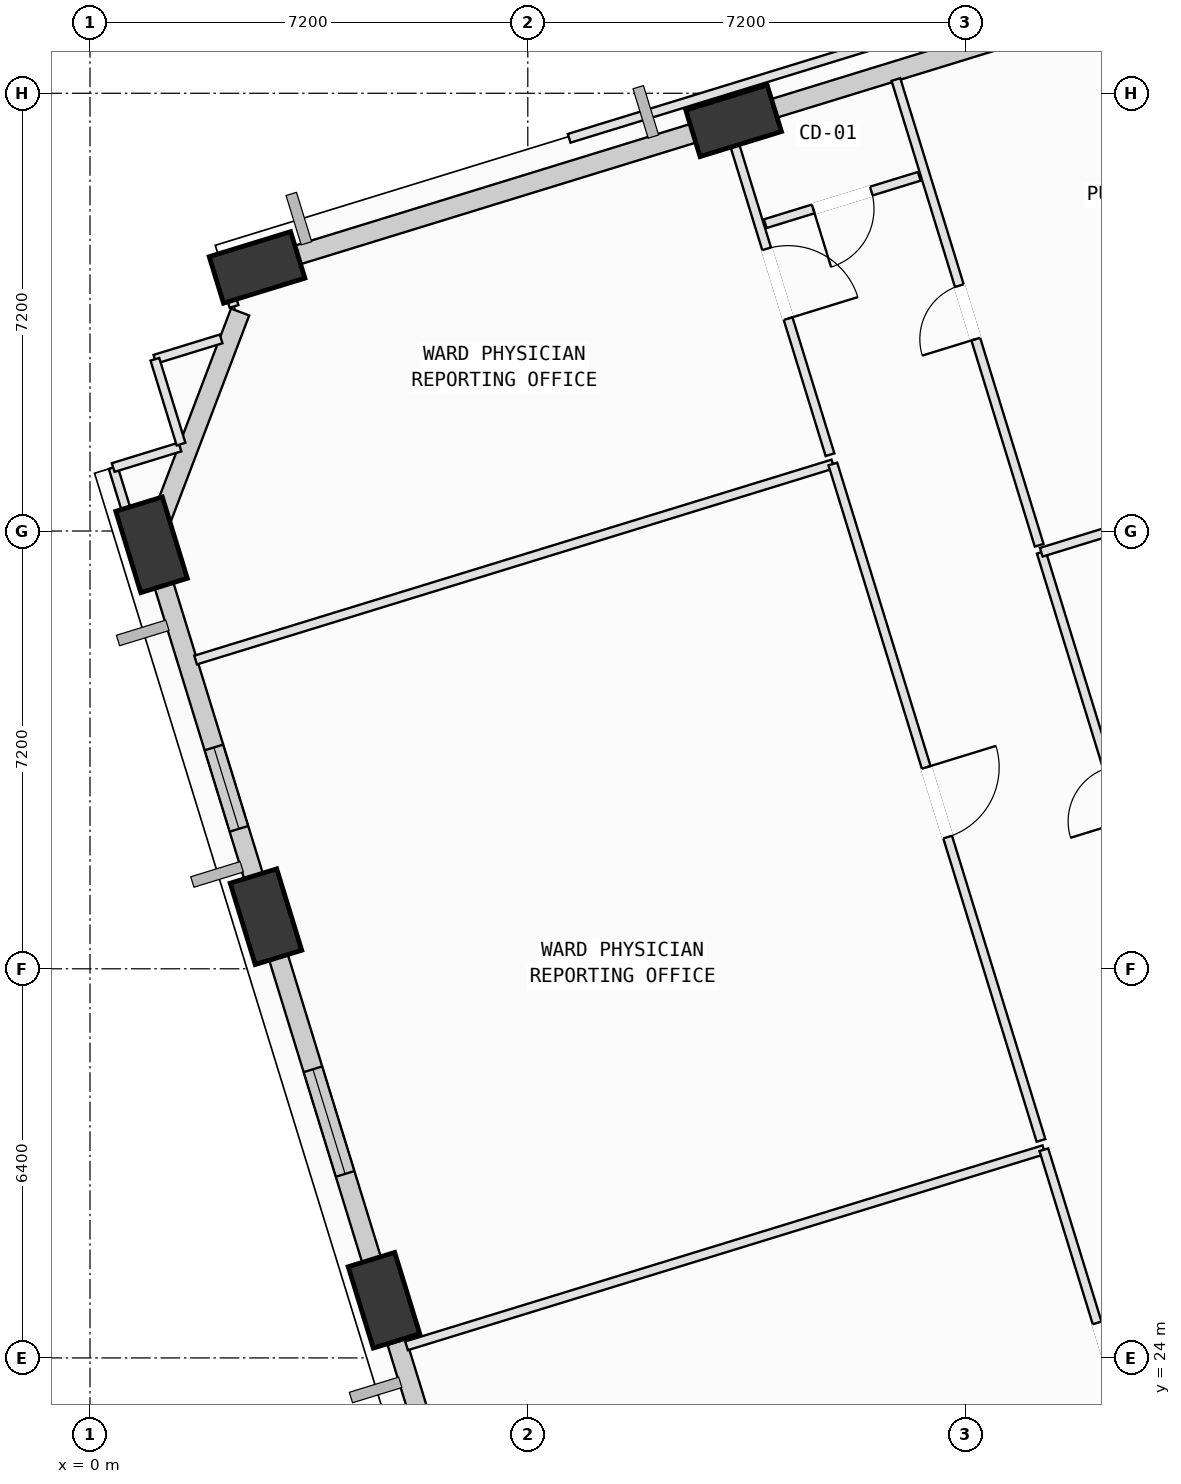
"""IFC4 building model, lengths in metres.
Left out: names, types, materials, properties, quantities, classifications, styles, units other than length and angle.
Written with IfcOpenShell. Run it as: python <this file> out.ifc"""

import sys

from ifc_helpers import new_model, si_unit, direction, frame, frame_2d, origin, origin_2d, place, context, subcontext, project, spatial, rectangle, extrude, element, fill, save


model = new_model("IFC4")
c1 = context("Model", 3, precision=1e-05, world=origin(), true_north=direction((0.0, 1.0)))
c2 = subcontext(c1, "Body", "Model", "MODEL_VIEW")
j1 = project(units=[si_unit("LENGTHUNIT", "METRE"), si_unit("PLANEANGLEUNIT", "RADIAN")], contexts=[c1])
p1 = place(None, origin())
s1 = spatial("IfcSite", under=j1, at=p1, CompositionType="ELEMENT")
p2 = place(p1, origin())
s2 = spatial("IfcBuilding", under=s1, at=p2, CompositionType="ELEMENT")
p3 = place(p2, frame((0.0, 0.0, 96.4)))
s3 = spatial("IfcBuildingStorey", under=s2, at=p3, CompositionType="ELEMENT", Elevation=96.4)
p4 = place(p3, frame((10.585, 44.347, 0.002), z_axis=(-0.079651712369, -0.095351707425, 0.992251811088), x_axis=(0.920581175981, -0.388838882589, 0.036532476201)))
e1 = element("IfcColumn", 1, at=p4, inside=s3, PredefinedType="COLUMN", context=c2, shape_type="SweptSolid", body=[
    extrude(rectangle(XDim=1.4, YDim=0.8, at=origin_2d()), origin(), (0.0, 0.0, 1.0), 4.028),
])
p5 = place(p3, frame((2.747, 41.935, 0.002), z_axis=(-0.069212686317, -0.127121641331, 0.989469399405), x_axis=(0.978560331574, -0.20151506119, 0.042560046794)))
e2 = element("IfcColumn", 2, at=p5, inside=s3, PredefinedType="COLUMN", context=c2, shape_type="SweptSolid", body=[
    extrude(rectangle(XDim=1.4, YDim=0.8, at=origin_2d()), origin(), (0.0, 0.0, 1.0), 4.039),
])
p6 = place(p3, frame((1.012, 37.374, 0.002), z_axis=(-0.050484662308, -0.134101773653, 0.989680763264), x_axis=(0.058089420302, 0.988872500431, 0.136955456772)))
e3 = element("IfcColumn", 3, at=p6, inside=s3, PredefinedType="COLUMN", context=c2, shape_type="SweptSolid", body=[
    extrude(rectangle(XDim=1.4, YDim=0.8, at=origin_2d()), origin(), (0.0, 0.0, 1.0), 4.038),
])
p7 = place(p3, frame((2.894, 31.256, 0.002), z_axis=(-0.025504522349, -0.126432157108, 0.991647330954), x_axis=(-0.100812738036, 0.987238333702, 0.123277184906)))
e4 = element("IfcColumn", 4, at=p7, inside=s3, PredefinedType="COLUMN", context=c2, shape_type="SweptSolid", body=[
    extrude(rectangle(XDim=1.4, YDim=0.8, at=origin_2d()), origin(), (0.0, 0.0, 1.0), 4.03),
])
p8 = place(p3, frame((4.835, 24.948, 0.002), z_axis=(0.000363967728, -0.118410834105, 0.99296462268), x_axis=(-0.296956141617, 0.948160358694, 0.113176782761)))
e5 = element("IfcColumn", 5, at=p8, inside=s3, PredefinedType="COLUMN", context=c2, shape_type="SweptSolid", body=[
    extrude(rectangle(XDim=1.4, YDim=0.8, at=origin_2d()), origin(), (0.0, 0.0, 1.0), 4.025),
])
p9 = place(p3, frame((10.841, 44.425, 0.0), z_axis=(0.0, 0.0, 1.0), x_axis=(0.95578995853, 0.294050259603, 0.0)))
e6 = element("IfcWall", 6, at=p9, inside=s3, PredefinedType="SOLIDWALL", context=c2, shape_type="SweptSolid", body=[
    extrude(rectangle(XDim=7.231, YDim=0.32, at=frame_2d((3.615, 0.0))), origin(), (0.0, 0.0, 1.0), 3.165),
])
p10 = place(p3, frame((2.98, 42.007, 0.0), z_axis=(0.0, 0.0, 1.0), x_axis=(0.955793529239, 0.294038653012, 0.0)))
e7 = element("IfcWall", 7, at=p10, inside=s3, PredefinedType="SOLIDWALL", context=c2, shape_type="SweptSolid", body=[
    extrude(rectangle(XDim=7.27, YDim=0.32, at=frame_2d((3.635, 0.0))), origin(), (0.0, 0.0, 1.0), 3.165),
])
p11 = place(p3, frame((1.086, 37.567, 0.0), z_axis=(0.0, 0.0, 1.0), x_axis=(0.355515016124, 0.934670569404, 0.0)))
e8 = element("IfcWall", 8, at=p11, inside=s3, PredefinedType="SOLIDWALL", context=c2, shape_type="SweptSolid", body=[
    extrude(rectangle(XDim=3.89, YDim=0.32, at=frame_2d((1.945, 0.0))), origin(), (0.0, 0.0, 1.0), 3.165),
])
p12 = place(p3, frame((2.82, 31.497, 0.0), z_axis=(0.0, 0.0, 1.0), x_axis=(-0.294044969851, 0.955791585915, 0.0)))
e9 = element("IfcWall", 9, at=p12, inside=s3, PredefinedType="SOLIDWALL", context=c2, shape_type="SweptSolid", body=[
    extrude(rectangle(XDim=5.456, YDim=0.32, at=frame_2d((2.728, 0.0))), origin(), (0.0, 0.0, 1.0), 3.165),
])
p13 = place(p12, frame((1.26, 0.0, 0.75)))
e10 = element("IfcOpeningElement", 10, at=p13, cuts=e9, PredefinedType="OPENING", context=c2, shape_type="SweptSolid", body=[
    extrude(rectangle(XDim=1.4, YDim=1.85, at=frame_2d((0.7, 0.925))), frame((0.0, 0.17, 0.0), z_axis=(0.0, -1.0, 0.0), x_axis=(1.0, 0.0, 0.0)), (0.0, 0.0, 1.0), 0.34),
])
p14 = place(p3, frame((4.757, 25.2, 0.0), z_axis=(0.0, 0.0, 1.0), x_axis=(-0.29404317004, 0.955792139617, 0.0)))
e11 = element("IfcWall", 11, at=p14, inside=s3, PredefinedType="SOLIDWALL", context=c2, shape_type="SweptSolid", body=[
    extrude(rectangle(XDim=5.628, YDim=0.32, at=frame_2d((2.814, 0.0))), origin(), (0.0, 0.0, 1.0), 3.165),
])
p15 = place(p14, frame((1.911, 0.0, 0.75)))
e12 = element("IfcOpeningElement", 12, at=p15, cuts=e11, PredefinedType="OPENING", context=c2, shape_type="SweptSolid", body=[
    extrude(rectangle(XDim=1.8, YDim=2.05, at=frame_2d((0.9, 1.025))), frame((0.0, 0.17, 0.0), z_axis=(0.0, -1.0, 0.0), x_axis=(1.0, 0.0, 0.0)), (0.0, 0.0, 1.0), 0.34),
])
p16 = place(p3, frame((6.711, 18.849, 0.0), z_axis=(0.0, 0.0, 1.0), x_axis=(-0.294022219877, 0.955798584545, 0.0)))
e13 = element("IfcWall", 13, at=p16, inside=s3, PredefinedType="SOLIDWALL", context=c2, shape_type="SweptSolid", body=[
    extrude(rectangle(XDim=5.662, YDim=0.32, at=frame_2d((2.831, 0.0))), origin(), (0.0, 0.0, 1.0), 3.165),
])
p17 = place(p16, frame((2.073, 0.0, 0.75)))
e14 = element("IfcOpeningElement", 14, at=p17, cuts=e13, PredefinedType="OPENING", context=c2, shape_type="SweptSolid", body=[
    extrude(rectangle(XDim=1.2, YDim=1.75, at=frame_2d((0.6, 0.875))), frame((0.0, 0.17, 0.0), z_axis=(0.0, -1.0, 0.0), x_axis=(1.0, 0.0, 0.0)), (0.0, 0.0, 1.0), 0.34),
])
p18 = place(p3, frame((5.206, 24.199, 0.0), z_axis=(0.0, 0.0, 1.0), x_axis=(0.955774194853, 0.294101493455, 0.0)))
e15 = element("IfcWall", 15, at=p18, inside=s3, PredefinedType="PARTITIONING", context=c2, shape_type="SweptSolid", body=[
    extrude(rectangle(XDim=10.966, YDim=0.15, at=frame_2d((5.483, 0.0))), origin(), (0.0, 0.0, 1.0), 3.78),
])
p19 = place(p3, frame((15.687, 27.424, 0.0), z_axis=(0.0, 0.0, 1.0), x_axis=(0.293975633895, -0.955812914056, 0.0)))
e16 = element("IfcWall", 16, at=p19, inside=s3, PredefinedType="PARTITIONING", context=c2, shape_type="SweptSolid", body=[
    extrude(rectangle(XDim=7.16, YDim=0.15, at=frame_2d((3.58, 0.0))), origin(), (0.0, 0.0, 1.0), 3.78),
])
p20 = place(p19, frame((2.98, 0.0, 0.0)))
e17 = element("IfcOpeningElement", 17, at=p20, cuts=e16, PredefinedType="OPENING", context=c2, shape_type="SweptSolid", body=[
    extrude(rectangle(XDim=1.2, YDim=2.15, at=frame_2d((0.6, 1.075))), frame((0.0, 0.085, 0.0), z_axis=(0.0, -1.0, 0.0), x_axis=(1.0, 0.0, 0.0)), (0.0, 0.0, 1.0), 0.17),
])
p21 = place(p3, frame((1.737, 35.478, 0.0), z_axis=(0.0, 0.0, 1.0), x_axis=(0.955797782575, 0.294024826886, 0.0)))
e18 = element("IfcWall", 18, at=p21, inside=s3, PredefinedType="PARTITIONING", context=c2, shape_type="SweptSolid", body=[
    extrude(rectangle(XDim=10.965, YDim=0.15, at=frame_2d((5.482, 0.0))), origin(), (0.0, 0.0, 1.0), 3.78),
])
p22 = place(p3, frame((12.217, 38.702, 0.0), z_axis=(0.0, 0.0, 1.0), x_axis=(0.294068161841, -0.955784450696, 0.0)))
e19 = element("IfcWall", 19, at=p22, inside=s3, PredefinedType="PARTITIONING", context=c2, shape_type="SweptSolid", body=[
    extrude(rectangle(XDim=11.64, YDim=0.15, at=frame_2d((5.82, 0.0))), origin(), (0.0, 0.0, 1.0), 3.78),
])
p23 = place(p22, frame((5.22, 0.0, 0.0)))
e20 = element("IfcOpeningElement", 20, at=p23, cuts=e19, PredefinedType="OPENING", context=c2, shape_type="SweptSolid", body=[
    extrude(rectangle(XDim=1.2, YDim=2.15, at=frame_2d((0.6, 1.075))), frame((0.0, 0.085, 0.0), z_axis=(0.0, -1.0, 0.0), x_axis=(1.0, 0.0, 0.0)), (0.0, 0.0, 1.0), 0.17),
])
p24 = place(p3, frame((4.81, 24.245, 0.0), z_axis=(0.0, 0.0, 1.0), x_axis=(-0.294122821945, 0.955767631598, 0.0)))
e21 = element("IfcWall", 21, at=p24, inside=s3, PredefinedType="PARTITIONING", context=c2, shape_type="SweptSolid", body=[
    extrude(rectangle(XDim=0.928, YDim=0.15, at=frame_2d((0.464, 0.0))), origin(), (0.0, 0.0, 1.0), 3.165),
])
p25 = place(p3, frame((2.883, 30.511, 0.0), z_axis=(0.0, 0.0, 1.0), x_axis=(-0.294282108484, 0.955718599079, 0.0)))
e22 = element("IfcWall", 22, at=p25, inside=s3, PredefinedType="PARTITIONING", context=c2, shape_type="SweptSolid", body=[
    extrude(rectangle(XDim=0.961, YDim=0.15, at=frame_2d((0.481, 0.0))), origin(), (0.0, 0.0, 1.0), 3.165),
])
p26 = place(p3, frame((1.067, 40.425, 0.0), z_axis=(0.0, 0.0, 1.0), x_axis=(0.955816062407, 0.29396539736, 0.0)))
e23 = element("IfcWall", 23, at=p26, inside=s3, PredefinedType="PARTITIONING", context=c2, shape_type="SweptSolid", body=[
    extrude(rectangle(XDim=1.139, YDim=0.15, at=frame_2d((0.57, 0.0))), origin(), (0.0, 0.0, 1.0), 3.78),
])
p27 = place(p3, frame((2.369, 41.294, 0.0), z_axis=(0.0, 0.0, 1.0), x_axis=(-0.293012731131, 0.956108539547, 0.0)))
e24 = element("IfcWall", 24, at=p27, inside=s3, PredefinedType="PARTITIONING", context=c2, shape_type="SweptSolid", body=[
    extrude(rectangle(XDim=0.672, YDim=0.15, at=frame_2d((0.336, 0.0))), origin(), (0.0, 0.0, 1.0), 2.965),
])
p28 = place(p3, frame((2.172, 41.936, 0.0), z_axis=(0.0, 0.0, 1.0), x_axis=(0.955872177554, 0.293782879313, 0.0)))
e25 = element("IfcWall", 25, at=p28, inside=s3, PredefinedType="PARTITIONING", context=c2, shape_type="SweptSolid", body=[
    extrude(rectangle(XDim=0.793, YDim=0.15, at=frame_2d((0.396, 0.0))), origin(), (0.0, 0.0, 1.0), 3.78),
])
p29 = place(p3, frame((9.878, 44.307, 0.0), z_axis=(0.0, 0.0, 1.0), x_axis=(0.955553962092, 0.294816257234, 0.0)))
e26 = element("IfcWall", 26, at=p29, inside=s3, PredefinedType="PARTITIONING", context=c2, shape_type="SweptSolid", body=[
    extrude(rectangle(XDim=0.587, YDim=0.15, at=frame_2d((0.293, 0.0))), origin(), (0.0, 0.0, 1.0), 3.78),
])
p30 = place(p3, frame((10.439, 44.48, 0.0), z_axis=(0.0, 0.0, 1.0), x_axis=(0.294114998969, -0.955770038964, 0.0)))
e27 = element("IfcWall", 27, at=p30, inside=s3, PredefinedType="PARTITIONING", context=c2, shape_type="SweptSolid", body=[
    extrude(rectangle(XDim=5.885, YDim=0.15, at=frame_2d((2.943, 0.0))), origin(), (0.0, 0.0, 1.0), 2.965),
])
p31 = place(p30, frame((2.343, 0.0, 0.0)))
e28 = element("IfcOpeningElement", 28, at=p31, cuts=e27, PredefinedType="OPENING", context=c2, shape_type="SweptSolid", body=[
    extrude(rectangle(XDim=1.2, YDim=2.15, at=frame_2d((0.6, 1.075))), frame((0.0, 0.085, 0.0), z_axis=(0.0, -1.0, 0.0), x_axis=(1.0, 0.0, 0.0)), (0.0, 0.0, 1.0), 0.17),
])
p32 = place(p3, frame((0.996, 36.644, 0.0), z_axis=(0.0, 0.0, 1.0), x_axis=(-0.293913664135, 0.955831971653, 0.0)))
e29 = element("IfcWall", 29, at=p32, inside=s3, PredefinedType="PARTITIONING", context=c2, shape_type="SweptSolid", body=[
    extrude(rectangle(XDim=2.093, YDim=0.15, at=frame_2d((1.046, 0.0))), origin(), (0.0, 0.0, 1.0), 3.165),
])
p33 = place(p3, frame((0.381, 38.644, 0.0), z_axis=(0.0, 0.0, 1.0), x_axis=(0.955834090857, 0.293906772217, 0.0)))
e30 = element("IfcWall", 30, at=p33, inside=s3, PredefinedType="PARTITIONING", context=c2, shape_type="SweptSolid", body=[
    extrude(rectangle(XDim=1.15, YDim=0.15, at=frame_2d((0.575, 0.0))), origin(), (0.0, 0.0, 1.0), 3.78),
])
p34 = place(p3, frame((1.497, 39.029, 0.0), z_axis=(0.0, 0.0, 1.0), x_axis=(-0.29448513117, 0.955656061311, 0.0)))
e31 = element("IfcWall", 31, at=p34, inside=s3, PredefinedType="PARTITIONING", context=c2, shape_type="SweptSolid", body=[
    extrude(rectangle(XDim=1.461, YDim=0.15, at=frame_2d((0.73, 0.0))), origin(), (0.0, 0.0, 1.0), 3.78),
])
p35 = place(p3, frame((18.097, 29.28, 0.0), z_axis=(0.0, 0.0, 1.0), x_axis=(-0.29400973267, 0.955802425763, 0.0)))
e32 = element("IfcWall", 32, at=p35, inside=s3, PredefinedType="PARTITIONING", context=c2, shape_type="SweptSolid", body=[
    extrude(rectangle(XDim=8.34, YDim=0.15, at=frame_2d((4.17, 0.0))), origin(), (0.0, 0.0, 1.0), 3.78),
])
p36 = place(p35, frame((3.71, 0.0, 0.0)))
e33 = element("IfcOpeningElement", 33, at=p36, cuts=e32, PredefinedType="OPENING", context=c2, shape_type="SweptSolid", body=[
    extrude(rectangle(XDim=0.92, YDim=2.1, at=frame_2d((0.46, 1.05))), frame((0.0, 0.085, 0.0), z_axis=(0.0, -1.0, 0.0), x_axis=(1.0, 0.0, 0.0)), (0.0, 0.0, 1.0), 0.17),
])
p37 = place(p3, frame((15.645, 37.251, 0.0), z_axis=(0.0, 0.0, 1.0), x_axis=(0.95579449844, 0.294035502537, 0.0)))
e34 = element("IfcWall", 34, at=p37, inside=s3, PredefinedType="PARTITIONING", context=c2, shape_type="SweptSolid", body=[
    extrude(rectangle(XDim=6.815, YDim=0.15, at=frame_2d((3.408, 0.0))), origin(), (0.0, 0.0, 1.0), 3.78),
])
p38 = place(p3, frame((15.61, 37.366, 0.0), z_axis=(0.0, 0.0, 1.0), x_axis=(-0.294006641811, 0.955803376522, 0.0)))
e35 = element("IfcWall", 35, at=p38, inside=s3, PredefinedType="PARTITIONING", context=c2, shape_type="SweptSolid", body=[
    extrude(rectangle(XDim=8.014, YDim=0.15, at=frame_2d((4.007, 0.0))), origin(), (0.0, 0.0, 1.0), 3.78),
])
p39 = place(p38, frame((3.547, 0.0, 0.0)))
e36 = element("IfcOpeningElement", 36, at=p39, cuts=e35, PredefinedType="OPENING", context=c2, shape_type="SweptSolid", body=[
    extrude(rectangle(XDim=0.92, YDim=2.1, at=frame_2d((0.46, 1.05))), frame((0.0, 0.085, 0.0), z_axis=(0.0, -1.0, 0.0), x_axis=(1.0, 0.0, 0.0)), (0.0, 0.0, 1.0), 0.17),
])
p40 = place(p3, frame((13.638, 43.434, 0.0), z_axis=(0.0, 0.0, 1.0), x_axis=(-0.955812865114, -0.29397579302, 0.0)))
e37 = element("IfcWall", 37, at=p40, inside=s3, PredefinedType="PARTITIONING", context=c2, shape_type="SweptSolid", body=[
    extrude(rectangle(XDim=2.65, YDim=0.15, at=frame_2d((1.325, 0.0))), origin(), (0.0, 0.0, 1.0), 3.78),
])
p41 = place(p40, frame((0.825, 0.0, 0.0)))
e38 = element("IfcOpeningElement", 38, at=p41, cuts=e37, PredefinedType="OPENING", context=c2, shape_type="SweptSolid", body=[
    extrude(rectangle(XDim=1.0, YDim=2.12, at=frame_2d((0.5, 1.06))), frame((0.0, 0.085, 0.0), z_axis=(0.0, -1.0, 0.0), x_axis=(1.0, 0.0, 0.0)), (0.0, 0.0, 1.0), 0.17),
])
p42 = place(p3, frame((7.88, 44.059, 0.0), z_axis=(0.0, 0.0, 1.0), x_axis=(0.955824308127, 0.29393858541, 0.0)))
e39 = element("IfcWall", 39, at=p42, inside=s3, PredefinedType="PARTITIONING", context=c2, shape_type="SweptSolid", body=[
    extrude(rectangle(XDim=6.641, YDim=0.15, at=frame_2d((3.32, 0.0))), origin(), (0.0, 0.0, 1.0), 3.78),
])
p43 = place(p13, origin())
e40 = element("IfcWindow", 40, at=p43, inside=s3, PartitioningType="SINGLE_PANEL", PredefinedType="WINDOW", context=c2, shape_type="SweptSolid", body=[
    extrude(rectangle(XDim=1.4, YDim=1.85, at=frame_2d((0.7, 0.925))), frame((0.0, 0.03, 0.0), z_axis=(0.0, -1.0, 0.0), x_axis=(1.0, 0.0, 0.0)), (0.0, 0.0, 1.0), 0.06),
])
fill(e10, e40)
p44 = place(p15, origin())
e41 = element("IfcWindow", 41, at=p44, inside=s3, PartitioningType="SINGLE_PANEL", PredefinedType="WINDOW", context=c2, shape_type="SweptSolid", body=[
    extrude(rectangle(XDim=1.8, YDim=2.05, at=frame_2d((0.9, 1.025))), frame((0.0, 0.03, 0.0), z_axis=(0.0, -1.0, 0.0), x_axis=(1.0, 0.0, 0.0)), (0.0, 0.0, 1.0), 0.06),
])
fill(e12, e41)
p45 = place(p20, origin())
e42 = element("IfcDoor", 42, at=p45, inside=s3, OperationType="SINGLE_SWING_RIGHT", PredefinedType="DOOR", context=c2, shape_type="SweptSolid", body=[
    extrude(rectangle(XDim=1.2, YDim=2.15, at=frame_2d((0.6, 1.075))), frame((0.0, 0.025, 0.0), z_axis=(0.0, -1.0, 0.0), x_axis=(1.0, 0.0, 0.0)), (0.0, 0.0, 1.0), 0.05),
])
fill(e17, e42)
p46 = place(p23, origin())
e43 = element("IfcDoor", 43, at=p46, inside=s3, OperationType="SINGLE_SWING_LEFT", PredefinedType="DOOR", context=c2, shape_type="SweptSolid", body=[
    extrude(rectangle(XDim=1.2, YDim=2.15, at=frame_2d((0.6, 1.075))), frame((0.0, 0.025, 0.0), z_axis=(0.0, -1.0, 0.0), x_axis=(1.0, 0.0, 0.0)), (0.0, 0.0, 1.0), 0.05),
])
fill(e20, e43)
p47 = place(p31, origin())
e44 = element("IfcDoor", 44, at=p47, inside=s3, OperationType="SINGLE_SWING_RIGHT", PredefinedType="DOOR", context=c2, shape_type="SweptSolid", body=[
    extrude(rectangle(XDim=1.2, YDim=2.15, at=frame_2d((0.6, 1.075))), frame((0.0, 0.025, 0.0), z_axis=(0.0, -1.0, 0.0), x_axis=(1.0, 0.0, 0.0)), (0.0, 0.0, 1.0), 0.05),
])
fill(e28, e44)
p48 = place(p39, origin())
e45 = element("IfcDoor", 45, at=p48, inside=s3, OperationType="SINGLE_SWING_LEFT", PredefinedType="DOOR", context=c2, shape_type="SweptSolid", body=[
    extrude(rectangle(XDim=0.92, YDim=2.1, at=frame_2d((0.46, 1.05))), frame((0.0, 0.025, 0.0), z_axis=(0.0, -1.0, 0.0), x_axis=(1.0, 0.0, 0.0)), (0.0, 0.0, 1.0), 0.05),
])
fill(e36, e45)
p49 = place(p41, origin())
e46 = element("IfcDoor", 46, at=p49, inside=s3, OperationType="SINGLE_SWING_RIGHT", PredefinedType="DOOR", context=c2, shape_type="SweptSolid", body=[
    extrude(rectangle(XDim=1.0, YDim=2.12, at=frame_2d((0.5, 1.06))), frame((0.0, 0.025, 0.0), z_axis=(0.0, -1.0, 0.0), x_axis=(1.0, 0.0, 0.0)), (0.0, 0.0, 1.0), 0.05),
])
fill(e38, e46)
save(model, sys.argv[1])
